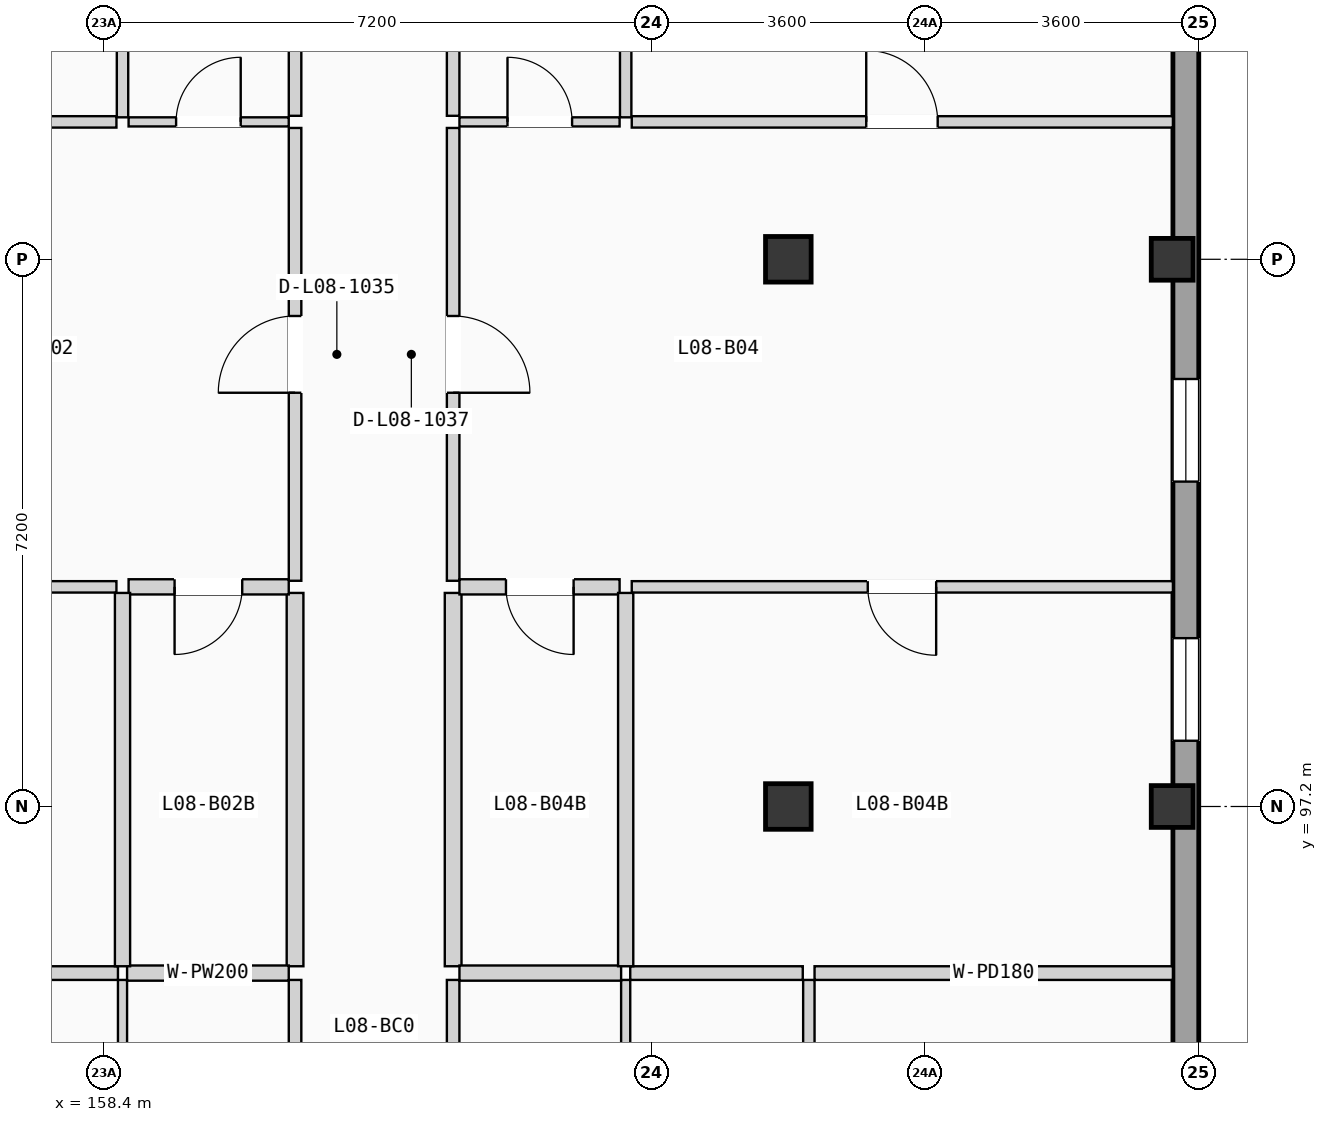
"""IFC4 building model, lengths in metres.
Left out: names, types, materials, properties, quantities, classifications, styles, units other than length and angle.
Written with IfcOpenShell. Run it as: python <this file> out.ifc"""

import sys

from ifc_helpers import new_model, si_unit, direction, frame, frame_2d, origin, origin_2d, place, context, subcontext, project, spatial, rectangle, extrude, element, fill, save


model = new_model("IFC4")
c1 = context("Model", 3, precision=1e-05, world=origin(), true_north=direction((0.0, 1.0)))
c2 = subcontext(c1, "Body", "Model", "MODEL_VIEW")
j1 = project(units=[si_unit("LENGTHUNIT", "METRE"), si_unit("PLANEANGLEUNIT", "RADIAN")], contexts=[c1])
p1 = place(None, origin())
s1 = spatial("IfcSite", under=j1, at=p1, CompositionType="ELEMENT")
p2 = place(p1, origin())
s2 = spatial("IfcBuilding", under=s1, at=p2, CompositionType="ELEMENT")
p3 = place(p2, frame((0.0, 0.0, 27.825)))
s3 = spatial("IfcBuildingStorey", under=s2, at=p3, CompositionType="ELEMENT", Elevation=27.825)
for number, where, z_axis, x_axis in (
    (1, (167.4, 97.2, 0.0), (0.0, 0.0, 1.0), (1.0, 0.0, 0.0)),
    (2, (167.4, 104.4, 0.0), (0.0, 0.0, 1.0), (1.0, 0.0, 0.0)),
):
    element("IfcColumn", number, at=place(p3, frame(where, z_axis=z_axis, x_axis=x_axis)), inside=s3, PredefinedType="COLUMN", context=c2, shape_type="SweptSolid", body=[
        extrude(rectangle(XDim=0.6, YDim=0.6, at=origin_2d()), origin(), (0.0, 0.0, 1.0), 3.15),
    ])
for number, where, z_axis, x_axis in (
    (3, (172.45, 97.2, 0.0), (0.0, 0.0, 1.0), (1.0, 0.0, 0.0)),
    (4, (172.45, 104.4, 0.0), (0.0, 0.0, 1.0), (1.0, 0.0, 0.0)),
):
    element("IfcColumn", number, at=place(p3, frame(where, z_axis=z_axis, x_axis=x_axis)), inside=s3, PredefinedType="COLUMN", context=c2, shape_type="SweptSolid", body=[
        extrude(rectangle(XDim=0.55, YDim=0.55, at=origin_2d()), origin(), (0.0, 0.0, 1.0), 3.15),
    ])
p4 = place(p3, frame((172.63, 68.74, 0.0), z_axis=(0.0, 0.0, 1.0), x_axis=(0.0, 1.0, 0.0)))
e5 = element("IfcWall", 5, at=p4, inside=s3, PredefinedType="SOLIDWALL", context=c2, shape_type="SweptSolid", body=[
    extrude(rectangle(XDim=49.72, YDim=0.34, at=frame_2d((24.86, 0.0))), origin(), (0.0, 0.0, 1.0), 2.89),
])
p5 = place(p4, frame((16.657, 0.0, 0.705)))
e6 = element("IfcOpeningElement", 6, at=p5, cuts=e5, PredefinedType="OPENING", context=c2, shape_type="SweptSolid", body=[
    extrude(rectangle(XDim=1.25, YDim=1.5, at=frame_2d((0.625, 0.75))), frame((0.0, 0.18, 0.0), z_axis=(0.0, -1.0, 0.0), x_axis=(1.0, 0.0, 0.0)), (0.0, 0.0, 1.0), 0.36),
])
p6 = place(p4, frame((9.528, 0.0, 0.555)))
e7 = element("IfcOpeningElement", 7, at=p6, cuts=e5, PredefinedType="OPENING", context=c2, shape_type="SweptSolid", body=[
    extrude(rectangle(XDim=1.25, YDim=1.65, at=frame_2d((0.625, 0.825))), frame((0.0, 0.18, 0.0), z_axis=(0.0, -1.0, 0.0), x_axis=(1.0, 0.0, 0.0)), (0.0, 0.0, 1.0), 0.36),
])
p7 = place(p4, frame((23.379, 0.0, 0.85)))
e8 = element("IfcOpeningElement", 8, at=p7, cuts=e5, PredefinedType="OPENING", context=c2, shape_type="SweptSolid", body=[
    extrude(rectangle(XDim=0.95, YDim=1.2, at=frame_2d((0.475, 0.6))), frame((0.0, 0.18, 0.0), z_axis=(0.0, -1.0, 0.0), x_axis=(1.0, 0.0, 0.0)), (0.0, 0.0, 1.0), 0.36),
])
p8 = place(p4, frame((32.735, 0.0, 0.9)))
e9 = element("IfcOpeningElement", 9, at=p8, cuts=e5, PredefinedType="OPENING", context=c2, shape_type="SweptSolid", body=[
    extrude(rectangle(XDim=1.35, YDim=1.2, at=frame_2d((0.675, 0.6))), frame((0.0, 0.18, 0.0), z_axis=(0.0, -1.0, 0.0), x_axis=(1.0, 0.0, 0.0)), (0.0, 0.0, 1.0), 0.36),
])
p9 = place(p4, frame((29.325, 0.0, 0.855)))
e10 = element("IfcOpeningElement", 10, at=p9, cuts=e5, PredefinedType="OPENING", context=c2, shape_type="SweptSolid", body=[
    extrude(rectangle(XDim=1.35, YDim=1.35, at=frame_2d((0.675, 0.675))), frame((0.0, 0.18, 0.0), z_axis=(0.0, -1.0, 0.0), x_axis=(1.0, 0.0, 0.0)), (0.0, 0.0, 1.0), 0.36),
])
p10 = place(p4, frame((39.329, 0.0, 0.705)))
e11 = element("IfcOpeningElement", 11, at=p10, cuts=e5, PredefinedType="OPENING", context=c2, shape_type="SweptSolid", body=[
    extrude(rectangle(XDim=1.35, YDim=1.5, at=frame_2d((0.675, 0.75))), frame((0.0, 0.18, 0.0), z_axis=(0.0, -1.0, 0.0), x_axis=(1.0, 0.0, 0.0)), (0.0, 0.0, 1.0), 0.36),
])
p11 = place(p3, frame((160.91, 89.133, 0.0), z_axis=(0.0, 0.0, 1.0), x_axis=(0.0, 1.0, 0.0)))
e12 = element("IfcWall", 12, at=p11, inside=s3, PredefinedType="PARTITIONING", context=c2, shape_type="SweptSolid", body=[
    extrude(rectangle(XDim=5.785, YDim=0.165, at=frame_2d((2.893, 0.0))), origin(), (0.0, 0.0, 1.0), 2.87),
])
p12 = place(p3, frame((160.91, 100.17, 0.0), z_axis=(0.0, 0.0, 1.0), x_axis=(0.0, 1.0, 0.0)))
e13 = element("IfcWall", 13, at=p12, inside=s3, PredefinedType="PARTITIONING", context=c2, shape_type="SweptSolid", body=[
    extrude(rectangle(XDim=5.958, YDim=0.165, at=frame_2d((2.979, 0.0))), origin(), (0.0, 0.0, 1.0), 2.87),
])
p13 = place(p12, frame((2.474, 0.0, 0.0)))
e14 = element("IfcOpeningElement", 14, at=p13, cuts=e13, PredefinedType="OPENING", context=c2, shape_type="SweptSolid", body=[
    extrude(rectangle(XDim=1.01, YDim=2.11, at=frame_2d((0.505, 1.055))), frame((0.0, 0.093, 0.0), z_axis=(0.0, -1.0, 0.0), x_axis=(1.0, 0.0, 0.0)), (0.0, 0.0, 1.0), 0.185),
])
p14 = place(p3, frame((160.91, 95.098, 0.0), z_axis=(0.0, 0.0, 1.0), x_axis=(0.0, 1.0, 0.0)))
e15 = element("IfcWall", 15, at=p14, inside=s3, PredefinedType="PLUMBINGWALL", context=c2, shape_type="SweptSolid", body=[
    extrude(rectangle(XDim=4.912, YDim=0.22, at=frame_2d((2.456, 0.0))), origin(), (0.0, 0.0, 1.0), 2.87),
])
p15 = place(p3, frame((160.91, 106.288, 0.0), z_axis=(0.0, 0.0, 1.0), x_axis=(0.0, 1.0, 0.0)))
e16 = element("IfcWall", 16, at=p15, inside=s3, PredefinedType="PARTITIONING", context=c2, shape_type="SweptSolid", body=[
    extrude(rectangle(XDim=4.912, YDim=0.165, at=frame_2d((2.456, 0.0))), origin(), (0.0, 0.0, 1.0), 2.87),
])
p16 = place(p3, frame((162.99, 89.133, 0.0), z_axis=(0.0, 0.0, 1.0), x_axis=(0.0, 1.0, 0.0)))
e17 = element("IfcWall", 17, at=p16, inside=s3, PredefinedType="PARTITIONING", context=c2, shape_type="SweptSolid", body=[
    extrude(rectangle(XDim=5.785, YDim=0.165, at=frame_2d((2.893, 0.0))), origin(), (0.0, 0.0, 1.0), 2.87),
])
p17 = place(p3, frame((162.99, 100.17, 0.0), z_axis=(0.0, 0.0, 1.0), x_axis=(0.0, 1.0, 0.0)))
e18 = element("IfcWall", 18, at=p17, inside=s3, PredefinedType="PARTITIONING", context=c2, shape_type="SweptSolid", body=[
    extrude(rectangle(XDim=5.958, YDim=0.165, at=frame_2d((2.979, 0.0))), origin(), (0.0, 0.0, 1.0), 2.87),
])
p18 = place(p17, frame((2.474, 0.0, 0.0)))
e19 = element("IfcOpeningElement", 19, at=p18, cuts=e18, PredefinedType="OPENING", context=c2, shape_type="SweptSolid", body=[
    extrude(rectangle(XDim=1.01, YDim=2.11, at=frame_2d((0.505, 1.055))), frame((0.0, 0.093, 0.0), z_axis=(0.0, -1.0, 0.0), x_axis=(1.0, 0.0, 0.0)), (0.0, 0.0, 1.0), 0.185),
])
p19 = place(p3, frame((162.99, 95.098, 0.0), z_axis=(0.0, 0.0, 1.0), x_axis=(0.0, 1.0, 0.0)))
e20 = element("IfcWall", 20, at=p19, inside=s3, PredefinedType="PLUMBINGWALL", context=c2, shape_type="SweptSolid", body=[
    extrude(rectangle(XDim=4.912, YDim=0.22, at=frame_2d((2.456, 0.0))), origin(), (0.0, 0.0, 1.0), 2.87),
])
p20 = place(p3, frame((162.99, 106.288, 0.0), z_axis=(0.0, 0.0, 1.0), x_axis=(0.0, 1.0, 0.0)))
e21 = element("IfcWall", 21, at=p20, inside=s3, PredefinedType="PARTITIONING", context=c2, shape_type="SweptSolid", body=[
    extrude(rectangle(XDim=4.912, YDim=0.165, at=frame_2d((2.456, 0.0))), origin(), (0.0, 0.0, 1.0), 2.87),
])
p21 = place(p3, frame((158.64, 89.113, 0.0), z_axis=(0.0, 0.0, 1.0), x_axis=(0.0, 1.0, 0.0)))
e22 = element("IfcWall", 22, at=p21, inside=s3, PredefinedType="PARTITIONING", context=c2, shape_type="SweptSolid", body=[
    extrude(rectangle(XDim=5.805, YDim=0.12, at=frame_2d((2.902, 0.0))), origin(), (0.0, 0.0, 1.0), 2.87),
])
p22 = place(p3, frame((158.7, 95.008, 0.0), z_axis=(0.0, 0.0, 1.0), x_axis=(1.0, 0.0, 0.0)))
e23 = element("IfcWall", 23, at=p22, inside=s3, PredefinedType="PLUMBINGWALL", context=c2, shape_type="SweptSolid", body=[
    extrude(rectangle(XDim=2.127, YDim=0.2, at=frame_2d((1.063, 0.0))), origin(), (0.0, 0.0, 1.0), 2.87),
])
p23 = place(p3, frame((156.305, 95.008, 0.0), z_axis=(0.0, 0.0, 1.0), x_axis=(1.0, 0.0, 0.0)))
e24 = element("IfcWall", 24, at=p23, inside=s3, PredefinedType="PARTITIONING", context=c2, shape_type="SweptSolid", body=[
    extrude(rectangle(XDim=2.275, YDim=0.18, at=frame_2d((1.138, 0.0))), origin(), (0.0, 0.0, 1.0), 2.87),
])
p24 = place(p3, frame((158.72, 100.09, 0.0), z_axis=(0.0, 0.0, 1.0), x_axis=(1.0, 0.0, 0.0)))
e25 = element("IfcWall", 25, at=p24, inside=s3, PredefinedType="PLUMBINGWALL", context=c2, shape_type="SweptSolid", body=[
    extrude(rectangle(XDim=2.107, YDim=0.2, at=frame_2d((1.053, 0.0))), origin(), (0.0, 0.0, 1.0), 2.87),
])
p25 = place(p24, frame((0.605, 0.0, 0.0)))
e26 = element("IfcOpeningElement", 26, at=p25, cuts=e25, PredefinedType="OPENING", context=c2, shape_type="SweptSolid", body=[
    extrude(rectangle(XDim=0.89, YDim=2.03, at=frame_2d((0.445, 1.015))), frame((0.0, 0.11, 0.0), z_axis=(0.0, -1.0, 0.0), x_axis=(1.0, 0.0, 0.0)), (0.0, 0.0, 1.0), 0.22),
])
p26 = place(p3, frame((158.72, 106.208, 0.0), z_axis=(0.0, 0.0, 1.0), x_axis=(1.0, 0.0, 0.0)))
e27 = element("IfcWall", 27, at=p26, inside=s3, PredefinedType="PARTITIONING", context=c2, shape_type="SweptSolid", body=[
    extrude(rectangle(XDim=2.107, YDim=0.12, at=frame_2d((1.053, 0.0))), origin(), (0.0, 0.0, 1.0), 2.87),
])
p27 = place(p26, frame((0.625, 0.0, 0.0)))
e28 = element("IfcOpeningElement", 28, at=p27, cuts=e27, PredefinedType="OPENING", context=c2, shape_type="SweptSolid", body=[
    extrude(rectangle(XDim=0.85, YDim=2.01, at=frame_2d((0.425, 1.005))), frame((0.0, 0.07, 0.0), z_axis=(0.0, -1.0, 0.0), x_axis=(1.0, 0.0, 0.0)), (0.0, 0.0, 1.0), 0.14),
])
p28 = place(p3, frame((151.54, 100.09, 0.0), z_axis=(0.0, 0.0, 1.0), x_axis=(1.0, 0.0, 0.0)))
e29 = element("IfcWall", 29, at=p28, inside=s3, PredefinedType="PARTITIONING", context=c2, shape_type="SweptSolid", body=[
    extrude(rectangle(XDim=7.02, YDim=0.15, at=frame_2d((3.51, 0.0))), origin(), (0.0, 0.0, 1.0), 2.87),
])
p29 = place(p28, frame((3.045, 0.0, 0.0)))
e30 = element("IfcOpeningElement", 30, at=p29, cuts=e29, PredefinedType="OPENING", context=c2, shape_type="SweptSolid", body=[
    extrude(rectangle(XDim=0.94, YDim=2.06, at=frame_2d((0.47, 1.03))), frame((0.0, 0.085, 0.0), z_axis=(0.0, -1.0, 0.0), x_axis=(1.0, 0.0, 0.0)), (0.0, 0.0, 1.0), 0.17),
])
p30 = place(p3, frame((151.54, 106.208, 0.0), z_axis=(0.0, 0.0, 1.0), x_axis=(1.0, 0.0, 0.0)))
e31 = element("IfcWall", 31, at=p30, inside=s3, PredefinedType="PARTITIONING", context=c2, shape_type="SweptSolid", body=[
    extrude(rectangle(XDim=7.02, YDim=0.15, at=frame_2d((3.51, 0.0))), origin(), (0.0, 0.0, 1.0), 2.87),
])
p31 = place(p30, frame((3.015, 0.0, 0.0)))
e32 = element("IfcOpeningElement", 32, at=p31, cuts=e31, PredefinedType="OPENING", context=c2, shape_type="SweptSolid", body=[
    extrude(rectangle(XDim=1.0, YDim=2.06, at=frame_2d((0.5, 1.03))), frame((0.0, 0.085, 0.0), z_axis=(0.0, -1.0, 0.0), x_axis=(1.0, 0.0, 0.0)), (0.0, 0.0, 1.0), 0.17),
])
p32 = place(p3, frame((158.64, 95.098, 0.0), z_axis=(0.0, 0.0, 1.0), x_axis=(0.0, 1.0, 0.0)))
e33 = element("IfcWall", 33, at=p32, inside=s3, PredefinedType="PLUMBINGWALL", context=c2, shape_type="SweptSolid", body=[
    extrude(rectangle(XDim=4.912, YDim=0.2, at=frame_2d((2.456, 0.0))), origin(), (0.0, 0.0, 1.0), 2.87),
])
p33 = place(p3, frame((158.64, 106.268, 0.0), z_axis=(0.0, 0.0, 1.0), x_axis=(0.0, 1.0, 0.0)))
e34 = element("IfcWall", 34, at=p33, inside=s3, PredefinedType="PARTITIONING", context=c2, shape_type="SweptSolid", body=[
    extrude(rectangle(XDim=4.932, YDim=0.15, at=frame_2d((2.466, 0.0))), origin(), (0.0, 0.0, 1.0), 2.87),
])
p34 = place(p3, frame((165.26, 89.113, 0.0), z_axis=(0.0, 0.0, 1.0), x_axis=(0.0, 1.0, 0.0)))
e35 = element("IfcWall", 35, at=p34, inside=s3, PredefinedType="PARTITIONING", context=c2, shape_type="SweptSolid", body=[
    extrude(rectangle(XDim=5.805, YDim=0.12, at=frame_2d((2.902, 0.0))), origin(), (0.0, 0.0, 1.0), 2.87),
])
p35 = place(p3, frame((163.073, 95.008, 0.0), z_axis=(0.0, 0.0, 1.0), x_axis=(1.0, 0.0, 0.0)))
e36 = element("IfcWall", 36, at=p35, inside=s3, PredefinedType="PLUMBINGWALL", context=c2, shape_type="SweptSolid", body=[
    extrude(rectangle(XDim=2.127, YDim=0.2, at=frame_2d((1.063, 0.0))), origin(), (0.0, 0.0, 1.0), 2.87),
])
p36 = place(p3, frame((167.67, 89.113, 0.0), z_axis=(0.0, 0.0, 1.0), x_axis=(0.0, 1.0, 0.0)))
e37 = element("IfcWall", 37, at=p36, inside=s3, PredefinedType="PARTITIONING", context=c2, shape_type="SweptSolid", body=[
    extrude(rectangle(XDim=5.805, YDim=0.15, at=frame_2d((2.902, 0.0))), origin(), (0.0, 0.0, 1.0), 2.87),
])
p37 = place(p3, frame((167.745, 95.008, 0.0), z_axis=(0.0, 0.0, 1.0), x_axis=(1.0, 0.0, 0.0)))
e38 = element("IfcWall", 38, at=p37, inside=s3, PredefinedType="PARTITIONING", context=c2, shape_type="SweptSolid", body=[
    extrude(rectangle(XDim=4.715, YDim=0.18, at=frame_2d((2.357, 0.0))), origin(), (0.0, 0.0, 1.0), 2.87),
])
p38 = place(p3, frame((165.32, 95.008, 0.0), z_axis=(0.0, 0.0, 1.0), x_axis=(1.0, 0.0, 0.0)))
e39 = element("IfcWall", 39, at=p38, inside=s3, PredefinedType="PARTITIONING", context=c2, shape_type="SweptSolid", body=[
    extrude(rectangle(XDim=2.27, YDim=0.18, at=frame_2d((1.135, 0.0))), origin(), (0.0, 0.0, 1.0), 2.87),
])
p39 = place(p3, frame((163.073, 100.09, 0.0), z_axis=(0.0, 0.0, 1.0), x_axis=(1.0, 0.0, 0.0)))
e40 = element("IfcWall", 40, at=p39, inside=s3, PredefinedType="PLUMBINGWALL", context=c2, shape_type="SweptSolid", body=[
    extrude(rectangle(XDim=2.107, YDim=0.2, at=frame_2d((1.053, 0.0))), origin(), (0.0, 0.0, 1.0), 2.87),
])
p40 = place(p39, frame((0.612, 0.0, 0.0)))
e41 = element("IfcOpeningElement", 41, at=p40, cuts=e40, PredefinedType="OPENING", context=c2, shape_type="SweptSolid", body=[
    extrude(rectangle(XDim=0.89, YDim=2.03, at=frame_2d((0.445, 1.015))), frame((0.0, 0.11, 0.0), z_axis=(0.0, -1.0, 0.0), x_axis=(1.0, 0.0, 0.0)), (0.0, 0.0, 1.0), 0.22),
])
p41 = place(p3, frame((163.073, 106.208, 0.0), z_axis=(0.0, 0.0, 1.0), x_axis=(1.0, 0.0, 0.0)))
e42 = element("IfcWall", 42, at=p41, inside=s3, PredefinedType="PARTITIONING", context=c2, shape_type="SweptSolid", body=[
    extrude(rectangle(XDim=2.107, YDim=0.12, at=frame_2d((1.053, 0.0))), origin(), (0.0, 0.0, 1.0), 2.87),
])
p42 = place(p41, frame((0.632, 0.0, 0.0)))
e43 = element("IfcOpeningElement", 43, at=p42, cuts=e42, PredefinedType="OPENING", context=c2, shape_type="SweptSolid", body=[
    extrude(rectangle(XDim=0.85, YDim=2.01, at=frame_2d((0.425, 1.005))), frame((0.0, 0.07, 0.0), z_axis=(0.0, -1.0, 0.0), x_axis=(1.0, 0.0, 0.0)), (0.0, 0.0, 1.0), 0.14),
])
p43 = place(p3, frame((165.34, 100.09, 0.0), z_axis=(0.0, 0.0, 1.0), x_axis=(1.0, 0.0, 0.0)))
e44 = element("IfcWall", 44, at=p43, inside=s3, PredefinedType="PARTITIONING", context=c2, shape_type="SweptSolid", body=[
    extrude(rectangle(XDim=7.12, YDim=0.15, at=frame_2d((3.56, 0.0))), origin(), (0.0, 0.0, 1.0), 2.87),
])
p44 = place(p43, frame((3.105, 0.0, 0.0)))
e45 = element("IfcOpeningElement", 45, at=p44, cuts=e44, PredefinedType="OPENING", context=c2, shape_type="SweptSolid", body=[
    extrude(rectangle(XDim=0.9, YDim=2.04, at=frame_2d((0.45, 1.02))), frame((0.0, 0.085, 0.0), z_axis=(0.0, -1.0, 0.0), x_axis=(1.0, 0.0, 0.0)), (0.0, 0.0, 1.0), 0.17),
])
p45 = place(p3, frame((165.34, 106.208, 0.0), z_axis=(0.0, 0.0, 1.0), x_axis=(1.0, 0.0, 0.0)))
e46 = element("IfcWall", 46, at=p45, inside=s3, PredefinedType="PARTITIONING", context=c2, shape_type="SweptSolid", body=[
    extrude(rectangle(XDim=7.12, YDim=0.15, at=frame_2d((3.56, 0.0))), origin(), (0.0, 0.0, 1.0), 2.87),
])
p46 = place(p45, frame((3.085, 0.0, 0.0)))
e47 = element("IfcOpeningElement", 47, at=p46, cuts=e46, PredefinedType="OPENING", context=c2, shape_type="SweptSolid", body=[
    extrude(rectangle(XDim=0.94, YDim=2.06, at=frame_2d((0.47, 1.03))), frame((0.0, 0.085, 0.0), z_axis=(0.0, -1.0, 0.0), x_axis=(1.0, 0.0, 0.0)), (0.0, 0.0, 1.0), 0.17),
])
p47 = place(p3, frame((165.26, 95.098, 0.0), z_axis=(0.0, 0.0, 1.0), x_axis=(0.0, 1.0, 0.0)))
e48 = element("IfcWall", 48, at=p47, inside=s3, PredefinedType="PLUMBINGWALL", context=c2, shape_type="SweptSolid", body=[
    extrude(rectangle(XDim=4.912, YDim=0.2, at=frame_2d((2.456, 0.0))), origin(), (0.0, 0.0, 1.0), 2.87),
])
p48 = place(p3, frame((165.26, 106.268, 0.0), z_axis=(0.0, 0.0, 1.0), x_axis=(0.0, 1.0, 0.0)))
e49 = element("IfcWall", 49, at=p48, inside=s3, PredefinedType="PARTITIONING", context=c2, shape_type="SweptSolid", body=[
    extrude(rectangle(XDim=4.932, YDim=0.15, at=frame_2d((2.466, 0.0))), origin(), (0.0, 0.0, 1.0), 2.87),
])
p49 = place(p8, origin())
e50 = element("IfcWindow", 50, at=p49, inside=s3, PartitioningType="SINGLE_PANEL", PredefinedType="WINDOW", context=c2, shape_type="SweptSolid", body=[
    extrude(rectangle(XDim=1.35, YDim=1.2, at=frame_2d((0.675, 0.6))), frame((0.0, 0.03, 0.0), z_axis=(0.0, -1.0, 0.0), x_axis=(1.0, 0.0, 0.0)), (0.0, 0.0, 1.0), 0.06),
])
fill(e9, e50)
p50 = place(p9, origin())
e51 = element("IfcWindow", 51, at=p50, inside=s3, PartitioningType="SINGLE_PANEL", PredefinedType="WINDOW", context=c2, shape_type="SweptSolid", body=[
    extrude(rectangle(XDim=1.35, YDim=1.35, at=frame_2d((0.675, 0.675))), frame((0.0, 0.03, 0.0), z_axis=(0.0, -1.0, 0.0), x_axis=(1.0, 0.0, 0.0)), (0.0, 0.0, 1.0), 0.06),
])
fill(e10, e51)
p51 = place(p13, origin())
e52 = element("IfcDoor", 52, at=p51, inside=s3, OperationType="SINGLE_SWING_LEFT", PredefinedType="DOOR", context=c2, shape_type="SweptSolid", body=[
    extrude(rectangle(XDim=1.01, YDim=2.11, at=frame_2d((0.505, 1.055))), frame((0.0, 0.025, 0.0), z_axis=(0.0, -1.0, 0.0), x_axis=(1.0, 0.0, 0.0)), (0.0, 0.0, 1.0), 0.05),
])
fill(e14, e52)
p52 = place(p18, frame((1.01, 0.0, 0.0), z_axis=(0.0, 0.0, 1.0), x_axis=(-1.0, 0.0, 0.0)))
e53 = element("IfcDoor", 53, at=p52, inside=s3, OperationType="SINGLE_SWING_LEFT", PredefinedType="DOOR", context=c2, shape_type="SweptSolid", body=[
    extrude(rectangle(XDim=1.01, YDim=2.11, at=frame_2d((0.505, 1.055))), frame((0.0, 0.025, 0.0), z_axis=(0.0, -1.0, 0.0), x_axis=(1.0, 0.0, 0.0)), (0.0, 0.0, 1.0), 0.05),
])
fill(e19, e53)
p53 = place(p25, frame((0.89, 0.0, 0.0), z_axis=(0.0, 0.0, 1.0), x_axis=(-1.0, 0.0, 0.0)))
e54 = element("IfcDoor", 54, at=p53, inside=s3, OperationType="SINGLE_SWING_LEFT", PredefinedType="DOOR", context=c2, shape_type="SweptSolid", body=[
    extrude(rectangle(XDim=0.89, YDim=2.03, at=frame_2d((0.445, 1.015))), frame((0.0, 0.025, 0.0), z_axis=(0.0, -1.0, 0.0), x_axis=(1.0, 0.0, 0.0)), (0.0, 0.0, 1.0), 0.05),
])
fill(e26, e54)
p54 = place(p27, origin())
e55 = element("IfcDoor", 55, at=p54, inside=s3, OperationType="SINGLE_SWING_RIGHT", PredefinedType="DOOR", context=c2, shape_type="SweptSolid", body=[
    extrude(rectangle(XDim=0.85, YDim=2.01, at=frame_2d((0.425, 1.005))), frame((0.0, 0.025, 0.0), z_axis=(0.0, -1.0, 0.0), x_axis=(1.0, 0.0, 0.0)), (0.0, 0.0, 1.0), 0.05),
])
fill(e28, e55)
p55 = place(p40, frame((0.89, 0.0, 0.0), z_axis=(0.0, 0.0, 1.0), x_axis=(-1.0, 0.0, 0.0)))
e56 = element("IfcDoor", 56, at=p55, inside=s3, OperationType="SINGLE_SWING_RIGHT", PredefinedType="DOOR", context=c2, shape_type="SweptSolid", body=[
    extrude(rectangle(XDim=0.89, YDim=2.03, at=frame_2d((0.445, 1.015))), frame((0.0, 0.025, 0.0), z_axis=(0.0, -1.0, 0.0), x_axis=(1.0, 0.0, 0.0)), (0.0, 0.0, 1.0), 0.05),
])
fill(e41, e56)
p56 = place(p42, origin())
e57 = element("IfcDoor", 57, at=p56, inside=s3, OperationType="SINGLE_SWING_LEFT", PredefinedType="DOOR", context=c2, shape_type="SweptSolid", body=[
    extrude(rectangle(XDim=0.85, YDim=2.01, at=frame_2d((0.425, 1.005))), frame((0.0, 0.025, 0.0), z_axis=(0.0, -1.0, 0.0), x_axis=(1.0, 0.0, 0.0)), (0.0, 0.0, 1.0), 0.05),
])
fill(e43, e57)
p57 = place(p44, frame((0.9, 0.0, 0.0), z_axis=(0.0, 0.0, 1.0), x_axis=(-1.0, 0.0, 0.0)))
e58 = element("IfcDoor", 58, at=p57, inside=s3, OperationType="SINGLE_SWING_RIGHT", PredefinedType="DOOR", context=c2, shape_type="SweptSolid", body=[
    extrude(rectangle(XDim=0.9, YDim=2.04, at=frame_2d((0.45, 1.02))), frame((0.0, 0.025, 0.0), z_axis=(0.0, -1.0, 0.0), x_axis=(1.0, 0.0, 0.0)), (0.0, 0.0, 1.0), 0.05),
])
fill(e45, e58)
p58 = place(p46, origin())
e59 = element("IfcDoor", 59, at=p58, inside=s3, OperationType="SINGLE_SWING_LEFT", PredefinedType="DOOR", context=c2, shape_type="SweptSolid", body=[
    extrude(rectangle(XDim=0.94, YDim=2.06, at=frame_2d((0.47, 1.03))), frame((0.0, 0.025, 0.0), z_axis=(0.0, -1.0, 0.0), x_axis=(1.0, 0.0, 0.0)), (0.0, 0.0, 1.0), 0.05),
])
fill(e47, e59)
save(model, sys.argv[1])
